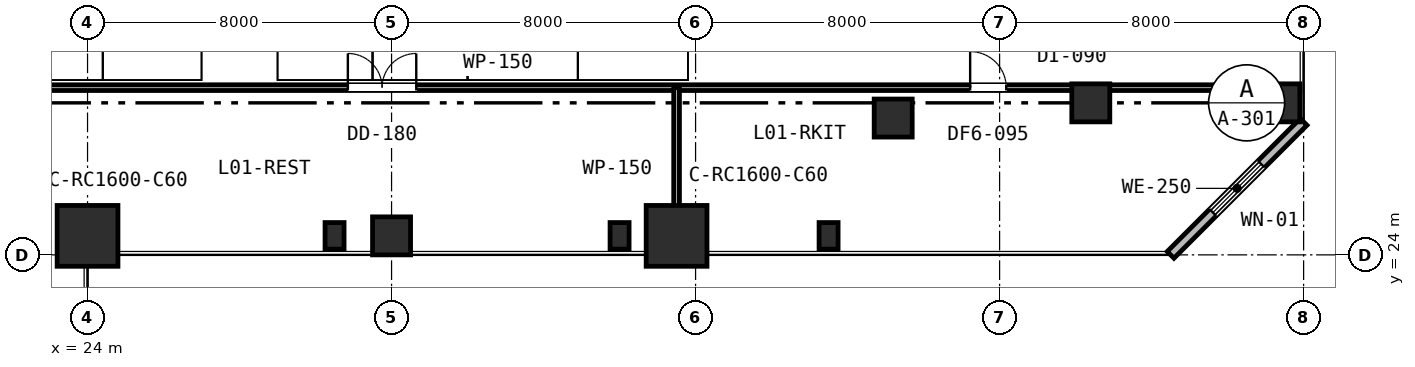
"""IFC4 building model, lengths in metres.
Left out: names, types, materials, properties, quantities, classifications, styles, units other than length and angle.
Written with IfcOpenShell. Run it as: python <this file> out.ifc"""

import sys

from ifc_helpers import new_model, si_unit, direction, frame, frame_2d, origin, origin_2d, place, context, subcontext, project, spatial, rectangle, extrude, element, fill, save


model = new_model("IFC4")
c1 = context("Model", 3, precision=1e-05, world=origin(), true_north=direction((0.0, 1.0)))
c2 = subcontext(c1, "Body", "Model", "MODEL_VIEW")
j1 = project(units=[si_unit("LENGTHUNIT", "METRE"), si_unit("PLANEANGLEUNIT", "RADIAN")], contexts=[c1])
p1 = place(None, origin())
s1 = spatial("IfcSite", under=j1, at=p1, CompositionType="ELEMENT")
p2 = place(p1, origin())
s2 = spatial("IfcBuilding", under=s1, at=p2, CompositionType="ELEMENT")
p3 = place(p2, frame((0.0, 0.0, 6.0)))
s3 = spatial("IfcBuildingStorey", under=s2, at=p3, CompositionType="ELEMENT", Elevation=6.0)
p4 = place(p3, frame((24.0, 24.5, 0.0), z_axis=(0.0, 0.0, 1.0), x_axis=(1.0, 0.0, 0.0)))
e1 = element("IfcColumn", 1, at=p4, inside=s3, PredefinedType="COLUMN", context=c2, shape_type="SweptSolid", body=[
    extrude(rectangle(XDim=1.6, YDim=1.6, at=origin_2d()), origin(), (0.0, 0.0, 1.0), 5.1),
])
p5 = place(p3, frame((32.0, 24.5, 0.0), z_axis=(0.0, 0.0, 1.0), x_axis=(1.0, 0.0, 0.0)))
e2 = element("IfcColumn", 2, at=p5, inside=s3, PredefinedType="COLUMN", context=c2, shape_type="SweptSolid", body=[
    extrude(rectangle(XDim=1.0, YDim=1.0, at=origin_2d()), origin(), (0.0, 0.0, 1.0), 5.1),
])
p6 = place(p3, frame((39.5, 24.5, 0.0), z_axis=(0.0, 0.0, 1.0), x_axis=(1.0, 0.0, 0.0)))
e3 = element("IfcColumn", 3, at=p6, inside=s3, PredefinedType="COLUMN", context=c2, shape_type="SweptSolid", body=[
    extrude(rectangle(XDim=1.6, YDim=1.6, at=origin_2d()), origin(), (0.0, 0.0, 1.0), 5.1),
])
for number, where, z_axis, x_axis in (
    (4, (45.2, 27.6, 0.0), (0.0, 0.0, 1.0), (1.0, 0.0, 0.0)),
    (5, (50.4, 28.0, 0.0), (0.0, 0.0, 1.0), (1.0, 0.0, 0.0)),
    (6, (55.4, 28.0, 0.0), (0.0, 0.0, 1.0), (1.0, 0.0, 0.0)),
):
    element("IfcColumn", number, at=place(p3, frame(where, z_axis=z_axis, x_axis=x_axis)), inside=s3, PredefinedType="COLUMN", context=c2, shape_type="SweptSolid", body=[
        extrude(rectangle(XDim=1.0, YDim=1.0, at=origin_2d()), origin(), (0.0, 0.0, 1.0), 5.1),
    ])
p7 = place(p3, frame((52.5, 24.0, 0.0), z_axis=(0.0, 0.0, 1.0), x_axis=(0.707106781187, 0.707106781187, 0.0)))
e7 = element("IfcWall", 7, at=p7, inside=s3, PredefinedType="STANDARD", context=c2, shape_type="SweptSolid", body=[
    extrude(rectangle(XDim=4.95, YDim=0.25, at=frame_2d((2.475, 0.0))), origin(), (0.0, 0.0, 1.0), 4.77),
])
p8 = place(p7, frame((1.575, 0.0, 0.75)))
e8 = element("IfcOpeningElement", 8, at=p8, cuts=e7, PredefinedType="OPENING", context=c2, shape_type="SweptSolid", body=[
    extrude(rectangle(XDim=1.8, YDim=1.85, at=frame_2d((0.9, 0.925))), frame((0.0, 0.135, 0.0), z_axis=(0.0, -1.0, 0.0), x_axis=(1.0, 0.0, 0.0)), (0.0, 0.0, 1.0), 0.27),
])
p9 = place(p3, frame((13.7, 28.4, 0.0), z_axis=(0.0, 0.0, 1.0), x_axis=(1.0, 0.0, 0.0)))
e9 = element("IfcWall", 9, at=p9, inside=s3, PredefinedType="PARTITIONING", context=c2, shape_type="SweptSolid", body=[
    extrude(rectangle(XDim=42.2, YDim=0.15, at=frame_2d((21.1, 0.0))), origin(), (0.0, 0.0, 1.0), 4.12),
])
p10 = place(p9, frame((17.15, 0.0, 0.0)))
e10 = element("IfcOpeningElement", 10, at=p10, cuts=e9, PredefinedType="OPENING", context=c2, shape_type="SweptSolid", body=[
    extrude(rectangle(XDim=1.8, YDim=2.15, at=frame_2d((0.9, 1.075))), frame((0.0, 0.085, 0.0), z_axis=(0.0, -1.0, 0.0), x_axis=(1.0, 0.0, 0.0)), (0.0, 0.0, 1.0), 0.17),
])
p11 = place(p9, frame((33.525, 0.0, 0.0)))
e11 = element("IfcOpeningElement", 11, at=p11, cuts=e9, PredefinedType="OPENING", context=c2, shape_type="SweptSolid", body=[
    extrude(rectangle(XDim=0.95, YDim=2.15, at=frame_2d((0.475, 1.075))), frame((0.0, 0.085, 0.0), z_axis=(0.0, -1.0, 0.0), x_axis=(1.0, 0.0, 0.0)), (0.0, 0.0, 1.0), 0.17),
])
p12 = place(p3, frame((39.5, 24.1, 0.0), z_axis=(0.0, 0.0, 1.0), x_axis=(0.0, 1.0, 0.0)))
e12 = element("IfcWall", 12, at=p12, inside=s3, PredefinedType="PARTITIONING", context=c2, shape_type="SweptSolid", body=[
    extrude(rectangle(XDim=4.3, YDim=0.15, at=frame_2d((2.15, 0.0))), origin(), (0.0, 0.0, 1.0), 4.12),
])
for number, where, z_axis, x_axis in (
    (13, (30.5, 24.5, 0.0), (0.0, 0.0, 1.0), (1.0, 0.0, 0.0)),
    (14, (38.0, 24.5, 0.0), (0.0, 0.0, 1.0), (1.0, 0.0, 0.0)),
    (15, (43.5, 24.5, 0.0), (0.0, 0.0, 1.0), (1.0, 0.0, 0.0)),
):
    element("IfcColumn", number, at=place(p3, frame(where, z_axis=z_axis, x_axis=x_axis)), inside=s3, PredefinedType="PILASTER", context=c2, shape_type="SweptSolid", body=[
        extrude(rectangle(XDim=0.5, YDim=0.7, at=origin_2d()), origin(), (0.0, 0.0, 1.0), 4.78),
    ])
p13 = place(p8, origin())
e16 = element("IfcWindow", 16, at=p13, inside=s3, PartitioningType="SINGLE_PANEL", PredefinedType="WINDOW", context=c2, shape_type="SweptSolid", body=[
    extrude(rectangle(XDim=1.8, YDim=1.85, at=frame_2d((0.9, 0.925))), frame((0.0, 0.03, 0.0), z_axis=(0.0, -1.0, 0.0), x_axis=(1.0, 0.0, 0.0)), (0.0, 0.0, 1.0), 0.06),
])
fill(e8, e16)
p14 = place(p10, origin())
e17 = element("IfcDoor", 17, at=p14, inside=s3, OperationType="DOUBLE_DOOR_SINGLE_SWING", PredefinedType="DOOR", context=c2, shape_type="SweptSolid", body=[
    extrude(rectangle(XDim=1.8, YDim=2.15, at=frame_2d((0.9, 1.075))), frame((0.0, 0.025, 0.0), z_axis=(0.0, -1.0, 0.0), x_axis=(1.0, 0.0, 0.0)), (0.0, 0.0, 1.0), 0.05),
])
fill(e10, e17)
p15 = place(p11, origin())
e18 = element("IfcDoor", 18, at=p15, inside=s3, OperationType="SINGLE_SWING_LEFT", PredefinedType="DOOR", context=c2, shape_type="SweptSolid", body=[
    extrude(rectangle(XDim=0.95, YDim=2.15, at=frame_2d((0.475, 1.075))), frame((0.0, 0.025, 0.0), z_axis=(0.0, -1.0, 0.0), x_axis=(1.0, 0.0, 0.0)), (0.0, 0.0, 1.0), 0.05),
])
fill(e11, e18)
save(model, sys.argv[1])
